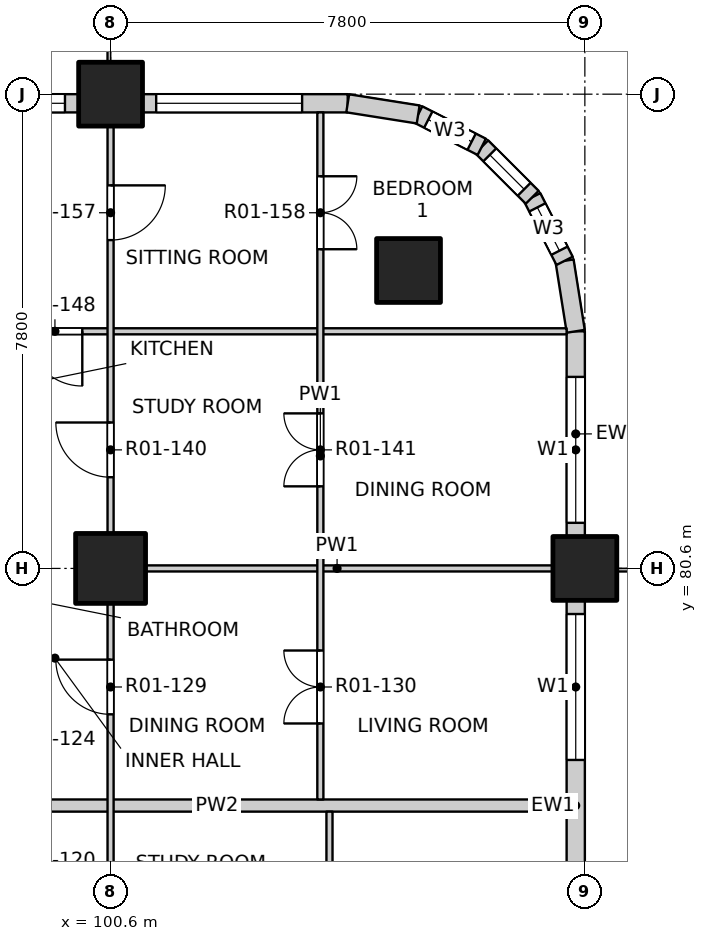
"""IFC4 building model, lengths in metres.
Left out: names, types, materials, properties, quantities, classifications, styles, units other than length and angle.
Written with IfcOpenShell. Run it as: python <this file> out.ifc"""

import sys

from ifc_helpers import new_model, si_unit, direction, frame, frame_2d, origin, origin_2d, place, context, subcontext, project, spatial, rectangle, extrude, element, fill, save


model = new_model("IFC4")
c1 = context("Model", 3, precision=1e-05, world=origin(), true_north=direction((0.0, 1.0)))
c2 = subcontext(c1, "Body", "Model", "MODEL_VIEW")
j1 = project(units=[si_unit("LENGTHUNIT", "METRE"), si_unit("PLANEANGLEUNIT", "RADIAN")], contexts=[c1])
p1 = place(None, origin())
s1 = spatial("IfcSite", under=j1, at=p1, CompositionType="ELEMENT")
p2 = place(p1, origin())
s2 = spatial("IfcBuilding", under=s1, at=p2, CompositionType="ELEMENT")
p3 = place(p2, frame((0.0, 0.0, 26.3)))
s3 = spatial("IfcBuildingStorey", under=s2, at=p3, CompositionType="ELEMENT", Elevation=26.3)
for number, where, z_axis, x_axis in (
    (1, (105.5, 85.5, -0.25), (0.0, 0.0, 1.0), (1.0, 0.0, 0.0)),
    (2, (108.4, 80.6, -0.25), (0.0, 0.0, 1.0), (1.0, 0.0, 0.0)),
    (3, (100.6, 88.4, -0.25), (0.0, 0.0, 1.0), (1.0, 0.0, 0.0)),
):
    element("IfcColumn", number, at=place(p3, frame(where, z_axis=z_axis, x_axis=x_axis)), inside=s3, PredefinedType="COLUMN", context=c2, shape_type="SweptSolid", body=[
        extrude(rectangle(XDim=1.05, YDim=1.05, at=origin_2d()), origin(), (0.0, 0.0, 1.0), 3.4),
    ])
p4 = place(p3, frame((100.6, 80.6, -0.25), z_axis=(0.0, 0.0, 1.0), x_axis=(1.0, 0.0, 0.0)))
e4 = element("IfcColumn", 4, at=p4, inside=s3, PredefinedType="COLUMN", context=c2, shape_type="SweptSolid", body=[
    extrude(rectangle(XDim=1.15, YDim=1.15, at=origin_2d()), origin(), (0.0, 0.0, 1.0), 3.4),
])
p5 = place(p3, frame((108.25, 73.325, 0.0), z_axis=(0.0, 0.0, 1.0), x_axis=(0.0, 1.0, 0.0)))
e5 = element("IfcWall", 5, at=p5, inside=s3, PredefinedType="SOLIDWALL", context=c2, shape_type="SweptSolid", body=[
    extrude(rectangle(XDim=6.75, YDim=0.3, at=frame_2d((3.375, 0.0))), origin(), (0.0, 0.0, 1.0), 2.7),
])
p6 = place(p5, frame((0.525, 0.0, 0.0)))
e6 = element("IfcOpeningElement", 6, at=p6, cuts=e5, PredefinedType="OPENING", context=c2, shape_type="SweptSolid", body=[
    extrude(rectangle(XDim=1.8, YDim=2.4, at=frame_2d((0.9, 1.2))), frame((0.0, 0.16, 0.0), z_axis=(0.0, -1.0, 0.0), x_axis=(1.0, 0.0, 0.0)), (0.0, 0.0, 1.0), 0.32),
])
p7 = place(p5, frame((4.125, 0.0, 0.9)))
e7 = element("IfcOpeningElement", 7, at=p7, cuts=e5, PredefinedType="OPENING", context=c2, shape_type="SweptSolid", body=[
    extrude(rectangle(XDim=2.4, YDim=1.8, at=frame_2d((1.2, 0.9))), frame((0.0, 0.16, 0.0), z_axis=(0.0, -1.0, 0.0), x_axis=(1.0, 0.0, 0.0)), (0.0, 0.0, 1.0), 0.32),
])
p8 = place(p3, frame((108.25, 81.125, 0.0), z_axis=(0.0, 0.0, 1.0), x_axis=(0.0, 1.0, 0.0)))
e8 = element("IfcWall", 8, at=p8, inside=s3, PredefinedType="SOLIDWALL", context=c2, shape_type="SweptSolid", body=[
    extrude(rectangle(XDim=3.375, YDim=0.3, at=frame_2d((1.688, 0.0))), origin(), (0.0, 0.0, 1.0), 2.7),
])
p9 = place(p8, frame((0.225, 0.0, 0.9)))
e9 = element("IfcOpeningElement", 9, at=p9, cuts=e8, PredefinedType="OPENING", context=c2, shape_type="SweptSolid", body=[
    extrude(rectangle(XDim=2.4, YDim=1.8, at=frame_2d((1.2, 0.9))), frame((0.0, 0.16, 0.0), z_axis=(0.0, -1.0, 0.0), x_axis=(1.0, 0.0, 0.0)), (0.0, 0.0, 1.0), 0.32),
])
p10 = place(p3, frame((93.325, 88.25, 0.0), z_axis=(0.0, 0.0, 1.0), x_axis=(1.0, 0.0, 0.0)))
e10 = element("IfcWall", 10, at=p10, inside=s3, PredefinedType="SOLIDWALL", context=c2, shape_type="SweptSolid", body=[
    extrude(rectangle(XDim=6.75, YDim=0.3, at=frame_2d((3.375, 0.0))), origin(), (0.0, 0.0, 1.0), 2.7),
])
p11 = place(p10, frame((0.525, 0.0, 0.0)))
e11 = element("IfcOpeningElement", 11, at=p11, cuts=e10, PredefinedType="OPENING", context=c2, shape_type="SweptSolid", body=[
    extrude(rectangle(XDim=1.8, YDim=2.4, at=frame_2d((0.9, 1.2))), frame((0.0, 0.16, 0.0), z_axis=(0.0, -1.0, 0.0), x_axis=(1.0, 0.0, 0.0)), (0.0, 0.0, 1.0), 0.32),
])
p12 = place(p10, frame((4.125, 0.0, 0.9)))
e12 = element("IfcOpeningElement", 12, at=p12, cuts=e10, PredefinedType="OPENING", context=c2, shape_type="SweptSolid", body=[
    extrude(rectangle(XDim=2.4, YDim=1.8, at=frame_2d((1.2, 0.9))), frame((0.0, 0.16, 0.0), z_axis=(0.0, -1.0, 0.0), x_axis=(1.0, 0.0, 0.0)), (0.0, 0.0, 1.0), 0.32),
])
p13 = place(p3, frame((101.125, 88.25, 0.0), z_axis=(0.0, 0.0, 1.0), x_axis=(1.0, 0.0, 0.0)))
e13 = element("IfcWall", 13, at=p13, inside=s3, PredefinedType="SOLIDWALL", context=c2, shape_type="SweptSolid", body=[
    extrude(rectangle(XDim=3.375, YDim=0.3, at=frame_2d((1.688, 0.0))), origin(), (0.0, 0.0, 1.0), 2.7),
])
p14 = place(p13, frame((0.225, 0.0, 0.9)))
e14 = element("IfcOpeningElement", 14, at=p14, cuts=e13, PredefinedType="OPENING", context=c2, shape_type="SweptSolid", body=[
    extrude(rectangle(XDim=2.4, YDim=1.8, at=frame_2d((1.2, 0.9))), frame((0.0, 0.16, 0.0), z_axis=(0.0, -1.0, 0.0), x_axis=(1.0, 0.0, 0.0)), (0.0, 0.0, 1.0), 0.32),
])
p15 = place(p3, frame((108.25, 84.5, 0.0), z_axis=(0.0, 0.0, 1.0), x_axis=(-0.156496880861, 0.987678452879, 0.0)))
e15 = element("IfcWall", 15, at=p15, inside=s3, PredefinedType="SOLIDWALL", context=c2, shape_type="SweptSolid", body=[
    extrude(rectangle(XDim=1.173, YDim=0.3, at=frame_2d((0.586, 0.0))), origin(), (0.0, 0.0, 1.0), 2.7),
])
p16 = place(p3, frame((108.066, 85.659, 0.0), z_axis=(0.0, 0.0, 1.0), x_axis=(-0.454025524128, 0.890988677504, 0.0)))
e16 = element("IfcWall", 16, at=p16, inside=s3, PredefinedType="SOLIDWALL", context=c2, shape_type="SweptSolid", body=[
    extrude(rectangle(XDim=1.173, YDim=0.3, at=frame_2d((0.587, 0.0))), origin(), (0.0, 0.0, 1.0), 2.7),
])
p17 = place(p16, frame((0.187, 0.0, 0.9)))
e17 = element("IfcOpeningElement", 17, at=p17, cuts=e16, PredefinedType="OPENING", context=c2, shape_type="SweptSolid", body=[
    extrude(rectangle(XDim=0.8, YDim=1.2, at=frame_2d((0.4, 0.6))), frame((0.0, 0.16, 0.0), z_axis=(0.0, -1.0, 0.0), x_axis=(1.0, 0.0, 0.0)), (0.0, 0.0, 1.0), 0.32),
])
p18 = place(p3, frame((107.534, 86.704, 0.0), z_axis=(0.0, 0.0, 1.0), x_axis=(-0.707106781187, 0.707106781187, 0.0)))
e18 = element("IfcWall", 18, at=p18, inside=s3, PredefinedType="SOLIDWALL", context=c2, shape_type="SweptSolid", body=[
    extrude(rectangle(XDim=1.173, YDim=0.3, at=frame_2d((0.586, 0.0))), origin(), (0.0, 0.0, 1.0), 2.7),
])
p19 = place(p18, frame((0.187, 0.0, 0.9)))
e19 = element("IfcOpeningElement", 19, at=p19, cuts=e18, PredefinedType="OPENING", context=c2, shape_type="SweptSolid", body=[
    extrude(rectangle(XDim=0.8, YDim=1.2, at=frame_2d((0.4, 0.6))), frame((0.0, 0.16, 0.0), z_axis=(0.0, -1.0, 0.0), x_axis=(1.0, 0.0, 0.0)), (0.0, 0.0, 1.0), 0.32),
])
p20 = place(p3, frame((106.704, 87.534, 0.0), z_axis=(0.0, 0.0, 1.0), x_axis=(-0.890988677504, 0.454025524128, 0.0)))
e20 = element("IfcWall", 20, at=p20, inside=s3, PredefinedType="SOLIDWALL", context=c2, shape_type="SweptSolid", body=[
    extrude(rectangle(XDim=1.173, YDim=0.3, at=frame_2d((0.587, 0.0))), origin(), (0.0, 0.0, 1.0), 2.7),
])
p21 = place(p20, frame((0.187, 0.0, 0.9)))
e21 = element("IfcOpeningElement", 21, at=p21, cuts=e20, PredefinedType="OPENING", context=c2, shape_type="SweptSolid", body=[
    extrude(rectangle(XDim=0.8, YDim=1.2, at=frame_2d((0.4, 0.6))), frame((0.0, 0.16, 0.0), z_axis=(0.0, -1.0, 0.0), x_axis=(1.0, 0.0, 0.0)), (0.0, 0.0, 1.0), 0.32),
])
p22 = place(p3, frame((105.659, 88.066, 0.0), z_axis=(0.0, 0.0, 1.0), x_axis=(-0.987678452879, 0.156496880861, 0.0)))
e22 = element("IfcWall", 22, at=p22, inside=s3, PredefinedType="SOLIDWALL", context=c2, shape_type="SweptSolid", body=[
    extrude(rectangle(XDim=1.173, YDim=0.3, at=frame_2d((0.586, 0.0))), origin(), (0.0, 0.0, 1.0), 2.7),
])
p23 = place(p3, frame((96.6, 76.7, 0.0), z_axis=(0.0, 0.0, 1.0), x_axis=(1.0, 0.0, 0.0)))
e23 = element("IfcWall", 23, at=p23, inside=s3, PredefinedType="PARTITIONING", context=c2, shape_type="SweptSolid", body=[
    extrude(rectangle(XDim=11.5, YDim=0.2, at=frame_2d((5.75, 0.0))), origin(), (0.0, 0.0, 1.0), 3.15),
])
p24 = place(p3, frame((100.55, 80.6, 0.0), z_axis=(0.0, 0.0, 1.0), x_axis=(1.0, 0.0, 0.0)))
e24 = element("IfcWall", 24, at=p24, inside=s3, PredefinedType="PARTITIONING", context=c2, shape_type="SweptSolid", body=[
    extrude(rectangle(XDim=7.55, YDim=0.1, at=frame_2d((3.775, 0.0))), origin(), (0.0, 0.0, 1.0), 2.55),
])
p25 = place(p3, frame((96.6, 84.5, 0.0), z_axis=(0.0, 0.0, 1.0), x_axis=(1.0, 0.0, 0.0)))
e25 = element("IfcWall", 25, at=p25, inside=s3, PredefinedType="PARTITIONING", context=c2, shape_type="SweptSolid", body=[
    extrude(rectangle(XDim=11.5, YDim=0.1, at=frame_2d((5.75, 0.0))), origin(), (0.0, 0.0, 1.0), 3.15),
])
p26 = place(p25, frame((2.635, 0.0, 0.0)))
e26 = element("IfcOpeningElement", 26, at=p26, cuts=e25, PredefinedType="OPENING", context=c2, shape_type="SweptSolid", body=[
    extrude(rectangle(XDim=0.9, YDim=2.1, at=frame_2d((0.45, 1.05))), frame((0.0, 0.06, 0.0), z_axis=(0.0, -1.0, 0.0), x_axis=(1.0, 0.0, 0.0)), (0.0, 0.0, 1.0), 0.12),
])
p27 = place(p3, frame((100.6, 49.4, 0.0), z_axis=(0.0, 0.0, 1.0), x_axis=(0.0, 1.0, 0.0)))
e27 = element("IfcWall", 27, at=p27, inside=s3, PredefinedType="PARTITIONING", context=c2, shape_type="SweptSolid", body=[
    extrude(rectangle(XDim=31.2, YDim=0.1, at=frame_2d((15.6, 0.0))), origin(), (0.0, 0.0, 1.0), 3.15),
])
p28 = place(p27, frame((1.5, 0.0, 0.0)))
e28 = element("IfcOpeningElement", 28, at=p28, cuts=e27, PredefinedType="OPENING", context=c2, shape_type="SweptSolid", body=[
    extrude(rectangle(XDim=0.9, YDim=2.1, at=frame_2d((0.45, 1.05))), frame((0.0, 0.06, 0.0), z_axis=(0.0, -1.0, 0.0), x_axis=(1.0, 0.0, 0.0)), (0.0, 0.0, 1.0), 0.12),
])
p29 = place(p27, frame((5.4, 0.0, 0.0)))
e29 = element("IfcOpeningElement", 29, at=p29, cuts=e27, PredefinedType="OPENING", context=c2, shape_type="SweptSolid", body=[
    extrude(rectangle(XDim=0.9, YDim=2.1, at=frame_2d((0.45, 1.05))), frame((0.0, 0.06, 0.0), z_axis=(0.0, -1.0, 0.0), x_axis=(1.0, 0.0, 0.0)), (0.0, 0.0, 1.0), 0.12),
])
p30 = place(p27, frame((10.275, 0.0, 0.0)))
e30 = element("IfcOpeningElement", 30, at=p30, cuts=e27, PredefinedType="OPENING", context=c2, shape_type="SweptSolid", body=[
    extrude(rectangle(XDim=0.9, YDim=2.1, at=frame_2d((0.45, 1.05))), frame((0.0, 0.06, 0.0), z_axis=(0.0, -1.0, 0.0), x_axis=(1.0, 0.0, 0.0)), (0.0, 0.0, 1.0), 0.12),
])
p31 = place(p27, frame((14.0, 0.0, 0.0)))
e31 = element("IfcOpeningElement", 31, at=p31, cuts=e27, PredefinedType="OPENING", context=c2, shape_type="SweptSolid", body=[
    extrude(rectangle(XDim=0.9, YDim=2.1, at=frame_2d((0.45, 1.05))), frame((0.0, 0.06, 0.0), z_axis=(0.0, -1.0, 0.0), x_axis=(1.0, 0.0, 0.0)), (0.0, 0.0, 1.0), 0.12),
])
p32 = place(p27, frame((17.1, 0.0, 0.0)))
e32 = element("IfcOpeningElement", 32, at=p32, cuts=e27, PredefinedType="OPENING", context=c2, shape_type="SweptSolid", body=[
    extrude(rectangle(XDim=0.9, YDim=2.1, at=frame_2d((0.45, 1.05))), frame((0.0, 0.06, 0.0), z_axis=(0.0, -1.0, 0.0), x_axis=(1.0, 0.0, 0.0)), (0.0, 0.0, 1.0), 0.12),
])
p33 = place(p27, frame((21.8, 0.0, 0.0)))
e33 = element("IfcOpeningElement", 33, at=p33, cuts=e27, PredefinedType="OPENING", context=c2, shape_type="SweptSolid", body=[
    extrude(rectangle(XDim=0.9, YDim=2.1, at=frame_2d((0.45, 1.05))), frame((0.0, 0.06, 0.0), z_axis=(0.0, -1.0, 0.0), x_axis=(1.0, 0.0, 0.0)), (0.0, 0.0, 1.0), 0.12),
])
p34 = place(p27, frame((24.9, 0.0, 0.0)))
e34 = element("IfcOpeningElement", 34, at=p34, cuts=e27, PredefinedType="OPENING", context=c2, shape_type="SweptSolid", body=[
    extrude(rectangle(XDim=0.9, YDim=2.1, at=frame_2d((0.45, 1.05))), frame((0.0, 0.06, 0.0), z_axis=(0.0, -1.0, 0.0), x_axis=(1.0, 0.0, 0.0)), (0.0, 0.0, 1.0), 0.12),
])
p35 = place(p27, frame((28.8, 0.0, 0.0)))
e35 = element("IfcOpeningElement", 35, at=p35, cuts=e27, PredefinedType="OPENING", context=c2, shape_type="SweptSolid", body=[
    extrude(rectangle(XDim=0.9, YDim=2.1, at=frame_2d((0.45, 1.05))), frame((0.0, 0.06, 0.0), z_axis=(0.0, -1.0, 0.0), x_axis=(1.0, 0.0, 0.0)), (0.0, 0.0, 1.0), 0.12),
])
p36 = place(p3, frame((100.6, 80.6, 0.0), z_axis=(0.0, 0.0, 1.0), x_axis=(0.0, 1.0, 0.0)))
e36 = element("IfcWall", 36, at=p36, inside=s3, PredefinedType="PARTITIONING", context=c2, shape_type="SweptSolid", body=[
    extrude(rectangle(XDim=7.5, YDim=0.1, at=frame_2d((3.75, 0.0))), origin(), (0.0, 0.0, 1.0), 2.55),
])
p37 = place(p36, frame((1.5, 0.0, 0.0)))
e37 = element("IfcOpeningElement", 37, at=p37, cuts=e36, PredefinedType="OPENING", context=c2, shape_type="SweptSolid", body=[
    extrude(rectangle(XDim=0.9, YDim=2.1, at=frame_2d((0.45, 1.05))), frame((0.0, 0.06, 0.0), z_axis=(0.0, -1.0, 0.0), x_axis=(1.0, 0.0, 0.0)), (0.0, 0.0, 1.0), 0.12),
])
p38 = place(p36, frame((5.4, 0.0, 0.0)))
e38 = element("IfcOpeningElement", 38, at=p38, cuts=e36, PredefinedType="OPENING", context=c2, shape_type="SweptSolid", body=[
    extrude(rectangle(XDim=0.9, YDim=2.1, at=frame_2d((0.45, 1.05))), frame((0.0, 0.06, 0.0), z_axis=(0.0, -1.0, 0.0), x_axis=(1.0, 0.0, 0.0)), (0.0, 0.0, 1.0), 0.12),
])
p39 = place(p3, frame((104.05, 76.8, 0.0), z_axis=(0.0, 0.0, 1.0), x_axis=(0.0, 1.0, 0.0)))
e39 = element("IfcWall", 39, at=p39, inside=s3, PredefinedType="PARTITIONING", context=c2, shape_type="SweptSolid", body=[
    extrude(rectangle(XDim=11.3, YDim=0.1, at=frame_2d((5.65, 0.0))), origin(), (0.0, 0.0, 1.0), 3.15),
])
p40 = place(p39, frame((1.25, 0.0, 0.0)))
e40 = element("IfcOpeningElement", 40, at=p40, cuts=e39, PredefinedType="OPENING", context=c2, shape_type="SweptSolid", body=[
    extrude(rectangle(XDim=1.2, YDim=2.1, at=frame_2d((0.6, 1.05))), frame((0.0, 0.06, 0.0), z_axis=(0.0, -1.0, 0.0), x_axis=(1.0, 0.0, 0.0)), (0.0, 0.0, 1.0), 0.12),
])
p41 = place(p39, frame((5.15, 0.0, 0.0)))
e41 = element("IfcOpeningElement", 41, at=p41, cuts=e39, PredefinedType="OPENING", context=c2, shape_type="SweptSolid", body=[
    extrude(rectangle(XDim=1.2, YDim=2.1, at=frame_2d((0.6, 1.05))), frame((0.0, 0.06, 0.0), z_axis=(0.0, -1.0, 0.0), x_axis=(1.0, 0.0, 0.0)), (0.0, 0.0, 1.0), 0.12),
])
p42 = place(p39, frame((9.05, 0.0, 0.0)))
e42 = element("IfcOpeningElement", 42, at=p42, cuts=e39, PredefinedType="OPENING", context=c2, shape_type="SweptSolid", body=[
    extrude(rectangle(XDim=1.2, YDim=2.1, at=frame_2d((0.6, 1.05))), frame((0.0, 0.06, 0.0), z_axis=(0.0, -1.0, 0.0), x_axis=(1.0, 0.0, 0.0)), (0.0, 0.0, 1.0), 0.12),
])
p43 = place(p3, frame((104.2, 61.2, 0.0), z_axis=(0.0, 0.0, 1.0), x_axis=(0.0, 1.0, 0.0)))
e43 = element("IfcWall", 43, at=p43, inside=s3, PredefinedType="PARTITIONING", context=c2, shape_type="SweptSolid", body=[
    extrude(rectangle(XDim=15.4, YDim=0.1, at=frame_2d((7.7, 0.0))), origin(), (0.0, 0.0, 1.0), 3.15),
])
p44 = place(p43, frame((0.425, 0.0, 0.0)))
e44 = element("IfcOpeningElement", 44, at=p44, cuts=e43, PredefinedType="OPENING", context=c2, shape_type="SweptSolid", body=[
    extrude(rectangle(XDim=0.9, YDim=2.1, at=frame_2d((0.45, 1.05))), frame((0.0, 0.06, 0.0), z_axis=(0.0, -1.0, 0.0), x_axis=(1.0, 0.0, 0.0)), (0.0, 0.0, 1.0), 0.12),
])
p45 = place(p43, frame((2.375, 0.0, 0.0)))
e45 = element("IfcOpeningElement", 45, at=p45, cuts=e43, PredefinedType="OPENING", context=c2, shape_type="SweptSolid", body=[
    extrude(rectangle(XDim=0.9, YDim=2.1, at=frame_2d((0.45, 1.05))), frame((0.0, 0.06, 0.0), z_axis=(0.0, -1.0, 0.0), x_axis=(1.0, 0.0, 0.0)), (0.0, 0.0, 1.0), 0.12),
])
p46 = place(p43, frame((5.15, 0.0, 0.0)))
e46 = element("IfcOpeningElement", 46, at=p46, cuts=e43, PredefinedType="OPENING", context=c2, shape_type="SweptSolid", body=[
    extrude(rectangle(XDim=1.2, YDim=2.1, at=frame_2d((0.6, 1.05))), frame((0.0, 0.06, 0.0), z_axis=(0.0, -1.0, 0.0), x_axis=(1.0, 0.0, 0.0)), (0.0, 0.0, 1.0), 0.12),
])
p47 = place(p43, frame((8.225, 0.0, 0.0)))
e47 = element("IfcOpeningElement", 47, at=p47, cuts=e43, PredefinedType="OPENING", context=c2, shape_type="SweptSolid", body=[
    extrude(rectangle(XDim=0.9, YDim=2.1, at=frame_2d((0.45, 1.05))), frame((0.0, 0.06, 0.0), z_axis=(0.0, -1.0, 0.0), x_axis=(1.0, 0.0, 0.0)), (0.0, 0.0, 1.0), 0.12),
])
p48 = place(p43, frame((10.175, 0.0, 0.0)))
e48 = element("IfcOpeningElement", 48, at=p48, cuts=e43, PredefinedType="OPENING", context=c2, shape_type="SweptSolid", body=[
    extrude(rectangle(XDim=0.9, YDim=2.1, at=frame_2d((0.45, 1.05))), frame((0.0, 0.06, 0.0), z_axis=(0.0, -1.0, 0.0), x_axis=(1.0, 0.0, 0.0)), (0.0, 0.0, 1.0), 0.12),
])
p49 = place(p43, frame((12.95, 0.0, 0.0)))
e49 = element("IfcOpeningElement", 49, at=p49, cuts=e43, PredefinedType="OPENING", context=c2, shape_type="SweptSolid", body=[
    extrude(rectangle(XDim=1.2, YDim=2.1, at=frame_2d((0.6, 1.05))), frame((0.0, 0.06, 0.0), z_axis=(0.0, -1.0, 0.0), x_axis=(1.0, 0.0, 0.0)), (0.0, 0.0, 1.0), 0.12),
])
p50 = place(p7, origin())
e50 = element("IfcWindow", 50, at=p50, inside=s3, PartitioningType="DOUBLE_PANEL_VERTICAL", PredefinedType="WINDOW", context=c2, shape_type="SweptSolid", body=[
    extrude(rectangle(XDim=2.4, YDim=1.8, at=frame_2d((1.2, 0.9))), frame((0.0, 0.03, 0.0), z_axis=(0.0, -1.0, 0.0), x_axis=(1.0, 0.0, 0.0)), (0.0, 0.0, 1.0), 0.06),
])
fill(e7, e50)
p51 = place(p9, origin())
e51 = element("IfcWindow", 51, at=p51, inside=s3, PartitioningType="DOUBLE_PANEL_VERTICAL", PredefinedType="WINDOW", context=c2, shape_type="SweptSolid", body=[
    extrude(rectangle(XDim=2.4, YDim=1.8, at=frame_2d((1.2, 0.9))), frame((0.0, 0.03, 0.0), z_axis=(0.0, -1.0, 0.0), x_axis=(1.0, 0.0, 0.0)), (0.0, 0.0, 1.0), 0.06),
])
fill(e9, e51)
p52 = place(p12, origin())
e52 = element("IfcWindow", 52, at=p52, inside=s3, PartitioningType="DOUBLE_PANEL_VERTICAL", PredefinedType="WINDOW", context=c2, shape_type="SweptSolid", body=[
    extrude(rectangle(XDim=2.4, YDim=1.8, at=frame_2d((1.2, 0.9))), frame((0.0, 0.03, 0.0), z_axis=(0.0, -1.0, 0.0), x_axis=(1.0, 0.0, 0.0)), (0.0, 0.0, 1.0), 0.06),
])
fill(e12, e52)
p53 = place(p14, origin())
e53 = element("IfcWindow", 53, at=p53, inside=s3, PartitioningType="DOUBLE_PANEL_VERTICAL", PredefinedType="WINDOW", context=c2, shape_type="SweptSolid", body=[
    extrude(rectangle(XDim=2.4, YDim=1.8, at=frame_2d((1.2, 0.9))), frame((0.0, 0.03, 0.0), z_axis=(0.0, -1.0, 0.0), x_axis=(1.0, 0.0, 0.0)), (0.0, 0.0, 1.0), 0.06),
])
fill(e14, e53)
p54 = place(p17, origin())
e54 = element("IfcWindow", 54, at=p54, inside=s3, PartitioningType="SINGLE_PANEL", PredefinedType="WINDOW", context=c2, shape_type="SweptSolid", body=[
    extrude(rectangle(XDim=0.8, YDim=1.2, at=frame_2d((0.4, 0.6))), frame((0.0, 0.03, 0.0), z_axis=(0.0, -1.0, 0.0), x_axis=(1.0, 0.0, 0.0)), (0.0, 0.0, 1.0), 0.06),
])
fill(e17, e54)
p55 = place(p19, origin())
e55 = element("IfcWindow", 55, at=p55, inside=s3, PartitioningType="SINGLE_PANEL", PredefinedType="WINDOW", context=c2, shape_type="SweptSolid", body=[
    extrude(rectangle(XDim=0.8, YDim=1.2, at=frame_2d((0.4, 0.6))), frame((0.0, 0.03, 0.0), z_axis=(0.0, -1.0, 0.0), x_axis=(1.0, 0.0, 0.0)), (0.0, 0.0, 1.0), 0.06),
])
fill(e19, e55)
p56 = place(p21, origin())
e56 = element("IfcWindow", 56, at=p56, inside=s3, PartitioningType="SINGLE_PANEL", PredefinedType="WINDOW", context=c2, shape_type="SweptSolid", body=[
    extrude(rectangle(XDim=0.8, YDim=1.2, at=frame_2d((0.4, 0.6))), frame((0.0, 0.03, 0.0), z_axis=(0.0, -1.0, 0.0), x_axis=(1.0, 0.0, 0.0)), (0.0, 0.0, 1.0), 0.06),
])
fill(e21, e56)
p57 = place(p35, origin())
e57 = element("IfcDoor", 57, at=p57, inside=s3, OperationType="SINGLE_SWING_RIGHT", PredefinedType="DOOR", context=c2, shape_type="SweptSolid", body=[
    extrude(rectangle(XDim=0.9, YDim=2.1, at=frame_2d((0.45, 1.05))), frame((0.0, 0.025, 0.0), z_axis=(0.0, -1.0, 0.0), x_axis=(1.0, 0.0, 0.0)), (0.0, 0.0, 1.0), 0.05),
])
fill(e35, e57)
p58 = place(p40, origin())
e58 = element("IfcDoor", 58, at=p58, inside=s3, OperationType="DOUBLE_DOOR_SINGLE_SWING", PredefinedType="DOOR", context=c2, shape_type="SweptSolid", body=[
    extrude(rectangle(XDim=1.2, YDim=2.1, at=frame_2d((0.6, 1.05))), frame((0.0, 0.025, 0.0), z_axis=(0.0, -1.0, 0.0), x_axis=(1.0, 0.0, 0.0)), (0.0, 0.0, 1.0), 0.05),
])
fill(e40, e58)
p59 = place(p37, origin())
e59 = element("IfcDoor", 59, at=p59, inside=s3, OperationType="SINGLE_SWING_RIGHT", PredefinedType="DOOR", context=c2, shape_type="SweptSolid", body=[
    extrude(rectangle(XDim=0.9, YDim=2.1, at=frame_2d((0.45, 1.05))), frame((0.0, 0.025, 0.0), z_axis=(0.0, -1.0, 0.0), x_axis=(1.0, 0.0, 0.0)), (0.0, 0.0, 1.0), 0.05),
])
fill(e37, e59)
p60 = place(p41, origin())
e60 = element("IfcDoor", 60, at=p60, inside=s3, OperationType="DOUBLE_DOOR_SINGLE_SWING", PredefinedType="DOOR", context=c2, shape_type="SweptSolid", body=[
    extrude(rectangle(XDim=1.2, YDim=2.1, at=frame_2d((0.6, 1.05))), frame((0.0, 0.025, 0.0), z_axis=(0.0, -1.0, 0.0), x_axis=(1.0, 0.0, 0.0)), (0.0, 0.0, 1.0), 0.05),
])
fill(e41, e60)
p61 = place(p26, origin())
e61 = element("IfcDoor", 61, at=p61, inside=s3, OperationType="SINGLE_SWING_LEFT", PredefinedType="DOOR", context=c2, shape_type="SweptSolid", body=[
    extrude(rectangle(XDim=0.9, YDim=2.1, at=frame_2d((0.45, 1.05))), frame((0.0, 0.025, 0.0), z_axis=(0.0, -1.0, 0.0), x_axis=(1.0, 0.0, 0.0)), (0.0, 0.0, 1.0), 0.05),
])
fill(e26, e61)
p62 = place(p38, origin())
e62 = element("IfcDoor", 62, at=p62, inside=s3, OperationType="SINGLE_SWING_LEFT", PredefinedType="DOOR", context=c2, shape_type="SweptSolid", body=[
    extrude(rectangle(XDim=0.9, YDim=2.1, at=frame_2d((0.45, 1.05))), frame((0.0, 0.025, 0.0), z_axis=(0.0, -1.0, 0.0), x_axis=(1.0, 0.0, 0.0)), (0.0, 0.0, 1.0), 0.05),
])
fill(e38, e62)
p63 = place(p42, origin())
e63 = element("IfcDoor", 63, at=p63, inside=s3, OperationType="DOUBLE_DOOR_SINGLE_SWING", PredefinedType="DOOR", context=c2, shape_type="SweptSolid", body=[
    extrude(rectangle(XDim=1.2, YDim=2.1, at=frame_2d((0.6, 1.05))), frame((0.0, 0.025, 0.0), z_axis=(0.0, -1.0, 0.0), x_axis=(1.0, 0.0, 0.0)), (0.0, 0.0, 1.0), 0.05),
])
fill(e42, e63)
save(model, sys.argv[1])
